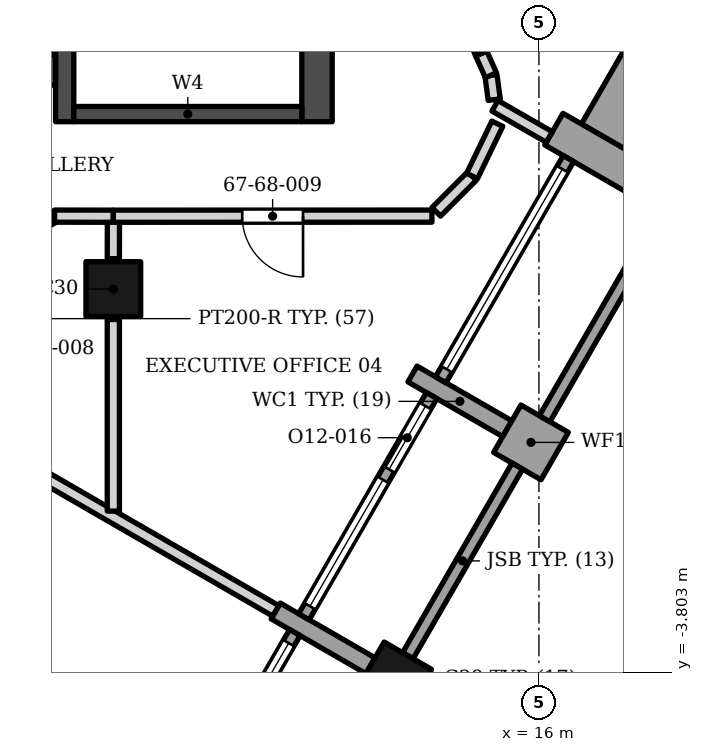
"""IFC4 building model, lengths in metres.
Left out: names, types, materials, properties, quantities, classifications, styles, units other than length and angle.
Written with IfcOpenShell. Run it as: python <this file> out.ifc"""

import sys

from ifc_helpers import new_model, si_unit, direction, frame, frame_2d, origin, origin_2d, place, context, subcontext, project, spatial, polyline, rectangle, outline, extrude, element, fill, save


model = new_model("IFC4")
c1 = context("Model", 3, precision=1e-05, world=origin(), true_north=direction((0.0, 1.0)))
c2 = subcontext(c1, "Body", "Model", "MODEL_VIEW")
j1 = project(units=[si_unit("LENGTHUNIT", "METRE"), si_unit("PLANEANGLEUNIT", "RADIAN")], contexts=[c1])
p1 = place(None, origin())
s1 = spatial("IfcSite", under=j1, at=p1, CompositionType="ELEMENT")
p2 = place(p1, origin())
s2 = spatial("IfcBuilding", under=s1, at=p2, CompositionType="ELEMENT")
p3 = place(p2, frame((0.0, 0.0, 279.4)))
s3 = spatial("IfcBuildingStorey", under=s2, at=p3, CompositionType="ELEMENT", Elevation=279.4)
p4 = place(p3, frame((12.35, 5.253, 0.0), z_axis=(0.0, 0.0, 1.0), x_axis=(0.0, 1.0, 0.0)))
e1 = element("IfcWall", 1, at=p4, inside=s3, PredefinedType="SHEAR", context=c2, shape_type="SweptSolid", body=[
    extrude(rectangle(XDim=13.8, YDim=0.5, at=frame_2d((6.9, 0.0))), origin(), (0.0, 0.0, 1.0), 3.9),
])
p5 = place(p3, frame((8.2, 5.253, 0.0), z_axis=(0.0, 0.0, 1.0), x_axis=(0.0, 1.0, 0.0)))
e2 = element("IfcWall", 2, at=p5, inside=s3, PredefinedType="SHEAR", context=c2, shape_type="SweptSolid", body=[
    extrude(rectangle(XDim=13.3, YDim=0.3, at=frame_2d((6.65, 0.0))), origin(), (0.0, 0.0, 1.0), 3.9),
])
p6 = place(p5, frame((7.1, 0.0, 0.0)))
e3 = element("IfcOpeningElement", 3, at=p6, cuts=e2, PredefinedType="OPENING", context=c2, shape_type="SweptSolid", body=[
    extrude(rectangle(XDim=1.4, YDim=2.1, at=frame_2d((0.7, 1.05))), frame((0.0, 0.16, 0.0), z_axis=(0.0, -1.0, 0.0), x_axis=(1.0, 0.0, 0.0)), (0.0, 0.0, 1.0), 0.32),
])
p7 = place(p5, frame((5.05, 0.0, 0.0)))
e4 = element("IfcOpeningElement", 4, at=p7, cuts=e2, PredefinedType="OPENING", context=c2, shape_type="SweptSolid", body=[
    extrude(rectangle(XDim=1.4, YDim=2.1, at=frame_2d((0.7, 1.05))), frame((0.0, 0.16, 0.0), z_axis=(0.0, -1.0, 0.0), x_axis=(1.0, 0.0, 0.0)), (0.0, 0.0, 1.0), 0.32),
])
p8 = place(p3, frame((8.35, 5.378, 0.0), z_axis=(0.0, 0.0, 1.0), x_axis=(1.0, 0.0, 0.0)))
e5 = element("IfcWall", 5, at=p8, inside=s3, PredefinedType="SHEAR", context=c2, shape_type="SweptSolid", body=[
    extrude(rectangle(XDim=3.75, YDim=0.25, at=frame_2d((1.875, 0.0))), origin(), (0.0, 0.0, 1.0), 3.9),
])
p9 = place(p3, frame((1.0, 6.103, 0.0), z_axis=(0.0, 0.0, 1.0), x_axis=(1.0, 0.0, 0.0)))
e6 = element("IfcWall", 6, at=p9, inside=s3, PredefinedType="SHEAR", context=c2, shape_type="SweptSolid", body=[
    extrude(rectangle(XDim=7.05, YDim=0.5, at=frame_2d((3.525, 0.0))), origin(), (0.0, 0.0, 1.0), 3.9),
])
p10 = place(p9, frame((5.325, 0.0, 0.0)))
e7 = element("IfcOpeningElement", 7, at=p10, cuts=e6, PredefinedType="OPENING", context=c2, shape_type="SweptSolid", body=[
    extrude(rectangle(XDim=0.9, YDim=2.1, at=frame_2d((0.45, 1.05))), frame((0.0, 0.26, 0.0), z_axis=(0.0, -1.0, 0.0), x_axis=(1.0, 0.0, 0.0)), (0.0, 0.0, 1.0), 0.52),
])
for number, where, z_axis, x_axis in (
    (8, (9.0, 2.5, 0.0), (0.0, 0.0, 1.0), (1.0, 0.0, 0.0)),
    (9, (13.619, -3.919, 0.0), (0.0, 0.0, 1.0), (0.5, 0.866, 0.0)),
):
    element("IfcColumn", number, at=place(p3, frame(where, z_axis=z_axis, x_axis=x_axis)), inside=s3, PredefinedType="COLUMN", context=c2, shape_type="SweptSolid", body=[
        extrude(rectangle(XDim=0.9, YDim=0.9, at=origin_2d()), origin(), (0.0, 0.0, 1.0), 3.9),
    ])
p11 = place(p3, frame((13.229, -3.694, 0.0), z_axis=(0.0, 0.0, 1.0), x_axis=(-0.866047807691, 0.499961193289, 0.0)))
e10 = element("IfcWall", 10, at=p11, inside=s3, PredefinedType="SOLIDWALL", context=c2, shape_type="SweptSolid", body=[
    extrude(rectangle(XDim=1.8, YDim=0.3, at=frame_2d((0.9, 0.0))), origin(), (0.0, 0.0, 1.0), 3.0),
])
p12 = place(p3, frame((15.479, 0.203, 0.0), z_axis=(0.0, 0.0, 1.0), x_axis=(0.865896406789, -0.500223362819, 0.0)))
e11 = element("IfcWall", 11, at=p12, inside=s3, PredefinedType="SOLIDWALL", context=c2, shape_type="SweptSolid", body=[
    extrude(rectangle(XDim=0.9, YDim=0.9, at=frame_2d((0.45, 0.0))), origin(), (0.0, 0.0, 1.0), 3.0),
])
p13 = place(p3, frame((15.479, 0.203, 0.0), z_axis=(0.0, 0.0, 1.0), x_axis=(-0.866047807691, 0.499961193289, 0.0)))
e12 = element("IfcWall", 12, at=p13, inside=s3, PredefinedType="SOLIDWALL", context=c2, shape_type="SweptSolid", body=[
    extrude(rectangle(XDim=1.8, YDim=0.3, at=frame_2d((0.9, 0.0))), origin(), (0.0, 0.0, 1.0), 3.0),
])
p14 = place(p3, frame((17.803, 4.231, 0.0), z_axis=(0.0, 0.0, 1.0), x_axis=(-0.866004803686, 0.500035678719, 0.0)))
e13 = element("IfcWall", 13, at=p14, inside=s3, PredefinedType="SOLIDWALL", context=c2, shape_type="SweptSolid", body=[
    extrude(rectangle(XDim=1.799, YDim=0.6, at=frame_2d((0.899, 0.0))), origin(), (0.0, 0.0, 1.0), 2.95),
])
p15 = place(p3, frame((9.885, -6.786, 0.0), z_axis=(0.0, 0.0, 1.0), x_axis=(0.500002543286, 0.866023935413, 0.0)))
e14 = element("IfcWall", 14, at=p15, inside=s3, PredefinedType="ELEMENTEDWALL", context=c2, shape_type="SweptSolid", body=[
    extrude(rectangle(XDim=4.2, YDim=0.2, at=frame_2d((2.1, 0.0))), origin(), (0.0, 0.0, 1.0), 3.0),
])
p16 = place(p15, frame((0.2, 0.0, 0.45)))
e15 = element("IfcOpeningElement", 15, at=p16, cuts=e14, PredefinedType="OPENING", context=c2, shape_type="SweptSolid", body=[
    extrude(rectangle(XDim=3.8, YDim=2.25, at=frame_2d((1.9, 1.125))), frame((0.0, 0.11, 0.0), z_axis=(0.0, -1.0, 0.0), x_axis=(1.0, 0.0, 0.0)), (0.0, 0.0, 1.0), 0.22),
])
p17 = place(p3, frame((13.844, -3.529, 0.0), z_axis=(0.0, 0.0, 1.0), x_axis=(0.500012057535, 0.866018442252, 0.0)))
e16 = element("IfcWall", 16, at=p17, inside=s3, PredefinedType="SOLIDWALL", context=c2, shape_type="SweptSolid", body=[
    extrude(rectangle(XDim=3.6, YDim=0.2, at=frame_2d((1.8, 0.0))), origin(), (0.0, 0.0, 1.0), 3.0),
])
p18 = place(p3, frame((12.135, -2.889, 0.0), z_axis=(0.0, 0.0, 1.0), x_axis=(0.500027713859, 0.866009402589, 0.0)))
e17 = element("IfcWall", 17, at=p18, inside=s3, PredefinedType="ELEMENTEDWALL", context=c2, shape_type="SweptSolid", body=[
    extrude(rectangle(XDim=4.2, YDim=0.2, at=frame_2d((2.1, 0.0))), origin(), (0.0, 0.0, 1.0), 3.0),
])
p19 = place(p18, frame((0.2, 0.0, 0.45)))
e18 = element("IfcOpeningElement", 18, at=p19, cuts=e17, PredefinedType="OPENING", context=c2, shape_type="SweptSolid", body=[
    extrude(rectangle(XDim=2.4, YDim=2.25, at=frame_2d((1.2, 1.125))), frame((0.0, 0.11, 0.0), z_axis=(0.0, -1.0, 0.0), x_axis=(1.0, 0.0, 0.0)), (0.0, 0.0, 1.0), 0.22),
])
p20 = place(p18, frame((2.8, 0.0, 0.0)))
e19 = element("IfcOpeningElement", 19, at=p20, cuts=e17, PredefinedType="OPENING", context=c2, shape_type="SweptSolid", body=[
    extrude(rectangle(XDim=1.2, YDim=2.7, at=frame_2d((0.6, 1.35))), frame((0.0, 0.11, 0.0), z_axis=(0.0, -1.0, 0.0), x_axis=(1.0, 0.0, 0.0)), (0.0, 0.0, 1.0), 0.22),
])
p21 = place(p3, frame((16.094, 0.368, 0.0), z_axis=(0.0, 0.0, 1.0), x_axis=(0.500012057535, 0.866018442252, 0.0)))
e20 = element("IfcWall", 20, at=p21, inside=s3, PredefinedType="SOLIDWALL", context=c2, shape_type="SweptSolid", body=[
    extrude(rectangle(XDim=3.6, YDim=0.2, at=frame_2d((1.8, 0.0))), origin(), (0.0, 0.0, 1.0), 3.0),
])
p22 = place(p3, frame((14.385, 1.008, 0.0), z_axis=(0.0, 0.0, 1.0), x_axis=(0.500027713859, 0.866009402589, 0.0)))
e21 = element("IfcWall", 21, at=p22, inside=s3, PredefinedType="ELEMENTEDWALL", context=c2, shape_type="SweptSolid", body=[
    extrude(rectangle(XDim=4.2, YDim=0.2, at=frame_2d((2.1, 0.0))), origin(), (0.0, 0.0, 1.0), 2.95),
])
p23 = place(p22, frame((0.2, 0.0, 0.45)))
e22 = element("IfcOpeningElement", 22, at=p23, cuts=e21, PredefinedType="OPENING", context=c2, shape_type="SweptSolid", body=[
    extrude(rectangle(XDim=3.8, YDim=2.25, at=frame_2d((1.9, 1.125))), frame((0.0, 0.11, 0.0), z_axis=(0.0, -1.0, 0.0), x_axis=(1.0, 0.0, 0.0)), (0.0, 0.0, 1.0), 0.22),
])
p24 = place(p3, origin())
e23 = element("IfcWall", 23, at=p24, inside=s3, PredefinedType="SOLIDWALL", context=c2, shape_type="SweptSolid", body=[
    extrude(outline(polyline([(18.734, 4.042), (18.733, 4.041), (18.734, 4.04), (20.271, 6.703), (18.236, 7.878), (16.698, 5.215), (17.954, 4.49), (17.954, 4.492), (18.734, 4.042)])), origin(), (0.0, 0.0, 1.0), 2.974),
])
p25 = place(p3, frame((6.086, 0.433, 0.0), z_axis=(0.0, 0.0, 1.0), x_axis=(0.866035557451, -0.499982412921, 0.0)))
e24 = element("IfcWall", 24, at=p25, inside=s3, PredefinedType="PARTITIONING", context=c2, shape_type="SweptSolid", body=[
    extrude(rectangle(XDim=6.449, YDim=0.2, at=frame_2d((3.225, 0.0))), origin(), (0.0, 0.0, 1.0), 3.052),
])
p26 = place(p3, frame((9.0, -1.152, 0.0), z_axis=(0.0, 0.0, 1.0), x_axis=(0.0, 1.0, 0.0)))
e25 = element("IfcWall", 25, at=p26, inside=s3, PredefinedType="PARTITIONING", context=c2, shape_type="SweptSolid", body=[
    extrude(rectangle(XDim=3.152, YDim=0.2, at=frame_2d((1.576, 0.0))), origin(), (0.0, 0.0, 1.0), 3.052),
])
p27 = place(p3, frame((9.0, 3.0, 0.0), z_axis=(0.0, 0.0, 1.0), x_axis=(0.002442989453, 0.999997015897, 0.0)))
e26 = element("IfcWall", 26, at=p27, inside=s3, PredefinedType="PARTITIONING", context=c2, shape_type="SweptSolid", body=[
    extrude(rectangle(XDim=0.6, YDim=0.2, at=frame_2d((0.3, 0.0))), origin(), (0.0, 0.0, 1.0), 3.332),
])
p28 = place(p3, frame((7.768, 3.546, 0.0), z_axis=(0.0, 0.0, 1.0), x_axis=(0.865826662844, 0.500344071524, 0.0)))
e27 = element("IfcWall", 27, at=p28, inside=s3, PredefinedType="PARTITIONING", context=c2, shape_type="SweptSolid", body=[
    extrude(rectangle(XDim=0.306, YDim=0.2, at=frame_2d((0.153, 0.0))), origin(), (0.0, 0.0, 1.0), 3.73),
])
p29 = place(p3, frame((8.033, 3.699, 0.0), z_axis=(0.0, 0.0, 1.0), x_axis=(0.99999885216, -0.001515149776, 0.0)))
e28 = element("IfcWall", 28, at=p29, inside=s3, PredefinedType="PARTITIONING", context=c2, shape_type="SweptSolid", body=[
    extrude(rectangle(XDim=0.967, YDim=0.2, at=frame_2d((0.483, 0.0))), origin(), (0.0, 0.0, 1.0), 3.73),
])
p30 = place(p3, frame((9.0, 3.698, 0.0), z_axis=(0.0, 0.0, 1.0), x_axis=(0.999999960922, 0.000279563869, 0.0)))
e29 = element("IfcWall", 29, at=p30, inside=s3, PredefinedType="PARTITIONING", context=c2, shape_type="SweptSolid", body=[
    extrude(rectangle(XDim=5.24, YDim=0.2, at=frame_2d((2.62, 0.0))), origin(), (0.0, 0.0, 1.0), 3.73),
])
p31 = place(p30, frame((2.12, 0.0, 0.0)))
e30 = element("IfcOpeningElement", 30, at=p31, cuts=e29, PredefinedType="OPENING", context=c2, shape_type="SweptSolid", body=[
    extrude(rectangle(XDim=1.0, YDim=2.4, at=frame_2d((0.5, 1.2))), frame((0.0, 0.11, 0.0), z_axis=(0.0, -1.0, 0.0), x_axis=(1.0, 0.0, 0.0)), (0.0, 0.0, 1.0), 0.22),
])
p32 = place(p3, frame((14.311, 3.77, 0.0), z_axis=(0.0, 0.0, 1.0), x_axis=(0.707106781187, 0.707106781187, 0.0)))
e31 = element("IfcWall", 31, at=p32, inside=s3, PredefinedType="PARTITIONING", context=c2, shape_type="SweptSolid", body=[
    extrude(rectangle(XDim=0.834, YDim=0.2, at=frame_2d((0.417, 0.0))), origin(), (0.0, 0.0, 1.0), 3.73),
])
p33 = place(p3, frame((15.277, 5.514, 0.0), z_axis=(0.0, 0.0, 1.0), x_axis=(0.866957478323, -0.498382113222, 0.0)))
e32 = element("IfcWall", 32, at=p33, inside=s3, PredefinedType="PARTITIONING", context=c2, shape_type="SweptSolid", body=[
    extrude(rectangle(XDim=1.031, YDim=0.2, at=frame_2d((0.515, 0.0))), origin(), (0.0, 0.0, 1.0), 2.95),
])
p34 = place(p3, frame((14.9, 4.36, 0.0), z_axis=(0.0, 0.0, 1.0), x_axis=(0.435199770088, 0.900333915897, 0.0)))
e33 = element("IfcWall", 33, at=p34, inside=s3, PredefinedType="PARTITIONING", context=c2, shape_type="SweptSolid", body=[
    extrude(rectangle(XDim=0.954, YDim=0.2, at=frame_2d((0.477, 0.0))), origin(), (0.0, 0.0, 1.0), 2.95),
])
p35 = place(p3, frame((15.211, 6.016, 0.0), z_axis=(0.0, 0.0, 1.0), x_axis=(0.133309467874, -0.991074460258, 0.0)))
e34 = element("IfcWall", 34, at=p35, inside=s3, PredefinedType="PARTITIONING", context=c2, shape_type="SweptSolid", body=[
    extrude(rectangle(XDim=0.405, YDim=0.2, at=frame_2d((0.202, 0.0))), origin(), (0.0, 0.0, 1.0), 3.73),
])
p36 = place(p3, frame((15.051, 6.374, 0.0), z_axis=(0.0, 0.0, 1.0), x_axis=(0.408161090952, -0.912909920985, 0.0)))
e35 = element("IfcWall", 35, at=p36, inside=s3, PredefinedType="PARTITIONING", context=c2, shape_type="SweptSolid", body=[
    extrude(rectangle(XDim=0.392, YDim=0.2, at=frame_2d((0.196, 0.0))), origin(), (0.0, 0.0, 1.0), 3.73),
])
p37 = place(p3, frame((14.425, 7.893, 0.0), z_axis=(0.0, 0.0, 1.0), x_axis=(0.380824536343, -0.924647323318, 0.0)))
e36 = element("IfcWall", 36, at=p37, inside=s3, PredefinedType="PARTITIONING", context=c2, shape_type="SweptSolid", body=[
    extrude(rectangle(XDim=1.643, YDim=0.2, at=frame_2d((0.822, 0.0))), origin(), (0.0, 0.0, 1.0), 3.73),
])
p38 = place(p16, origin())
e37 = element("IfcWindow", 37, at=p38, inside=s3, PartitioningType="SINGLE_PANEL", PredefinedType="WINDOW", context=c2, shape_type="SweptSolid", body=[
    extrude(rectangle(XDim=3.8, YDim=2.25, at=frame_2d((1.9, 1.125))), frame((0.0, 0.03, 0.0), z_axis=(0.0, -1.0, 0.0), x_axis=(1.0, 0.0, 0.0)), (0.0, 0.0, 1.0), 0.06),
])
fill(e15, e37)
p39 = place(p19, origin())
e38 = element("IfcWindow", 38, at=p39, inside=s3, PartitioningType="SINGLE_PANEL", PredefinedType="WINDOW", context=c2, shape_type="SweptSolid", body=[
    extrude(rectangle(XDim=2.4, YDim=2.25, at=frame_2d((1.2, 1.125))), frame((0.0, 0.03, 0.0), z_axis=(0.0, -1.0, 0.0), x_axis=(1.0, 0.0, 0.0)), (0.0, 0.0, 1.0), 0.06),
])
fill(e18, e38)
p40 = place(p20, origin())
e39 = element("IfcDoor", 39, at=p40, inside=s3, OperationType="SINGLE_SWING_LEFT", PredefinedType="DOOR", context=c2, shape_type="SweptSolid", body=[
    extrude(rectangle(XDim=1.2, YDim=2.7, at=frame_2d((0.6, 1.35))), frame((0.0, 0.025, 0.0), z_axis=(0.0, -1.0, 0.0), x_axis=(1.0, 0.0, 0.0)), (0.0, 0.0, 1.0), 0.05),
])
fill(e19, e39)
p41 = place(p23, origin())
e40 = element("IfcWindow", 40, at=p41, inside=s3, PartitioningType="SINGLE_PANEL", PredefinedType="WINDOW", context=c2, shape_type="SweptSolid", body=[
    extrude(rectangle(XDim=3.8, YDim=2.25, at=frame_2d((1.9, 1.125))), frame((0.0, 0.03, 0.0), z_axis=(0.0, -1.0, 0.0), x_axis=(1.0, 0.0, 0.0)), (0.0, 0.0, 1.0), 0.06),
])
fill(e22, e40)
p42 = place(p31, origin())
e41 = element("IfcDoor", 41, at=p42, inside=s3, OperationType="SINGLE_SWING_RIGHT", PredefinedType="DOOR", context=c2, shape_type="SweptSolid", body=[
    extrude(rectangle(XDim=1.0, YDim=2.4, at=frame_2d((0.5, 1.2))), frame((0.0, 0.025, 0.0), z_axis=(0.0, -1.0, 0.0), x_axis=(1.0, 0.0, 0.0)), (0.0, 0.0, 1.0), 0.05),
])
fill(e30, e41)
save(model, sys.argv[1])
